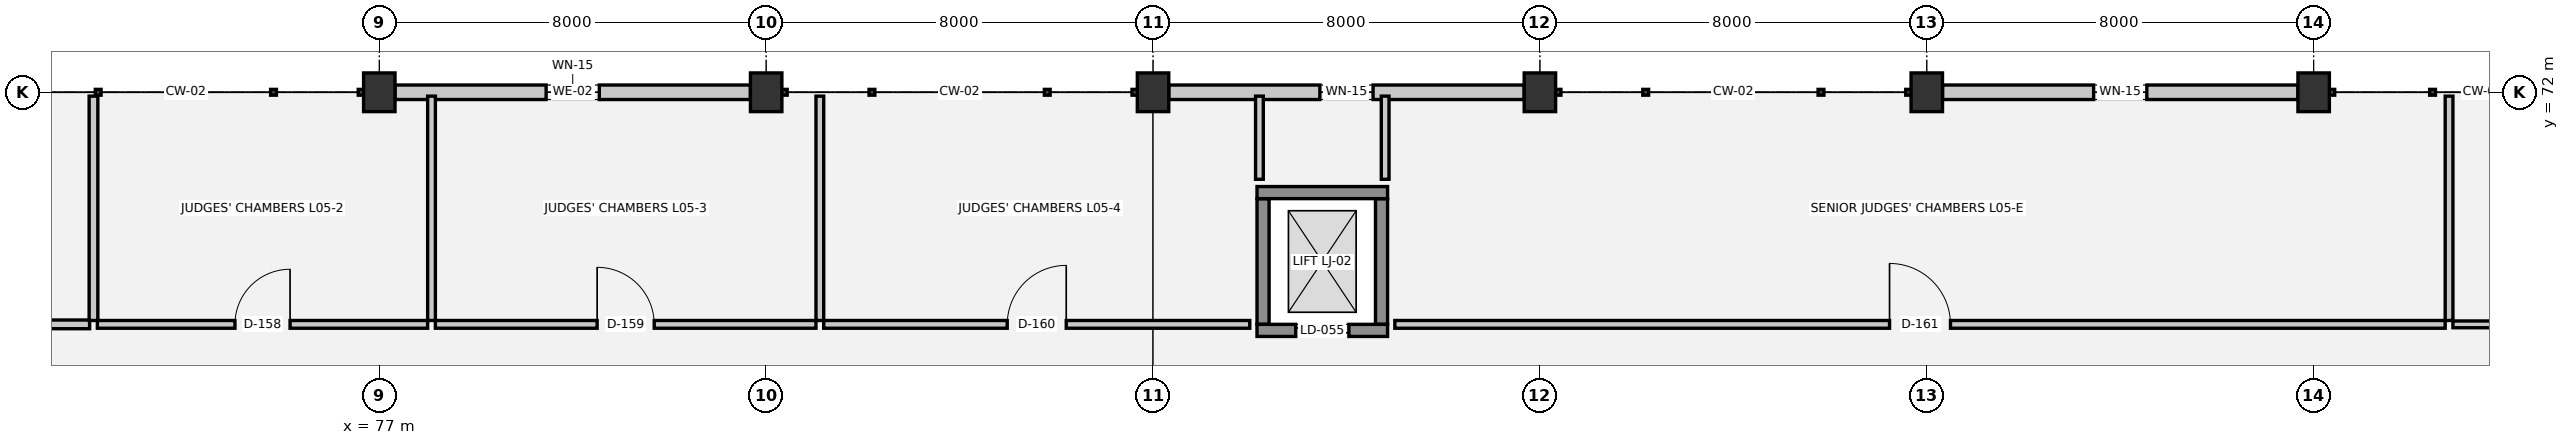
"""IFC4 building model, lengths in metres.
Left out: names, types, materials, properties, quantities, classifications, styles, units other than length and angle.
Written with IfcOpenShell. Run it as: python <this file> out.ifc"""

import sys

from ifc_helpers import new_model, si_unit, direction, frame, frame_2d, origin, origin_2d, place, context, subcontext, project, spatial, rectangle, extrude, element, fill, save


model = new_model("IFC4")
c1 = context("Model", 3, precision=1e-05, world=origin(), true_north=direction((0.0, 1.0)))
c2 = subcontext(c1, "Body", "Model", "MODEL_VIEW")
j1 = project(units=[si_unit("LENGTHUNIT", "METRE"), si_unit("PLANEANGLEUNIT", "RADIAN")], contexts=[c1])
p1 = place(None, origin())
s1 = spatial("IfcSite", under=j1, at=p1, CompositionType="ELEMENT")
p2 = place(p1, origin())
s2 = spatial("IfcBuilding", under=s1, at=p2, CompositionType="ELEMENT")
p3 = place(p2, frame((0.0, 0.0, 18.3)))
s3 = spatial("IfcBuildingStorey", under=s2, at=p3, CompositionType="ELEMENT", Elevation=18.3)
for number, where, z_axis, x_axis in (
    (1, (77.0, 72.0, 0.0), (0.0, 0.0, 1.0), (1.0, 0.0, 0.0)),
    (2, (85.0, 72.0, 0.0), (0.0, 0.0, 1.0), (1.0, 0.0, 0.0)),
    (3, (93.0, 72.0, 0.0), (0.0, 0.0, 1.0), (1.0, 0.0, 0.0)),
    (4, (101.0, 72.0, 0.0), (0.0, 0.0, 1.0), (1.0, 0.0, 0.0)),
    (5, (109.0, 72.0, 0.0), (0.0, 0.0, 1.0), (1.0, 0.0, 0.0)),
    (6, (117.0, 72.0, 0.0), (0.0, 0.0, 1.0), (1.0, 0.0, 0.0)),
):
    element("IfcColumn", number, at=place(p3, frame(where, z_axis=z_axis, x_axis=x_axis)), inside=s3, PredefinedType="COLUMN", context=c2, shape_type="SweptSolid", body=[
        extrude(rectangle(XDim=0.65, YDim=0.8, at=origin_2d()), origin(), (0.0, 0.0, 1.0), 3.75),
    ])
p4 = place(p3, frame((77.325, 72.0, 0.0), z_axis=(0.0, 0.0, 1.0), x_axis=(1.0, 0.0, 0.0)))
e7 = element("IfcWall", 7, at=p4, inside=s3, PredefinedType="SOLIDWALL", context=c2, shape_type="SweptSolid", body=[
    extrude(rectangle(XDim=7.35, YDim=0.3, at=frame_2d((3.675, 0.0))), origin(), (0.0, 0.0, 1.0), 2.6),
])
p5 = place(p4, frame((3.125, 0.0, 0.9)))
e8 = element("IfcOpeningElement", 8, at=p5, cuts=e7, PredefinedType="OPENING", context=c2, shape_type="SweptSolid", body=[
    extrude(rectangle(XDim=1.1, YDim=1.2, at=frame_2d((0.55, 0.6))), frame((0.0, 0.16, 0.0), z_axis=(0.0, -1.0, 0.0), x_axis=(1.0, 0.0, 0.0)), (0.0, 0.0, 1.0), 0.32),
])
p6 = place(p3, frame((93.325, 72.0, 0.0), z_axis=(0.0, 0.0, 1.0), x_axis=(1.0, 0.0, 0.0)))
e9 = element("IfcWall", 9, at=p6, inside=s3, PredefinedType="SOLIDWALL", context=c2, shape_type="SweptSolid", body=[
    extrude(rectangle(XDim=7.35, YDim=0.3, at=frame_2d((3.675, 0.0))), origin(), (0.0, 0.0, 1.0), 2.6),
])
p7 = place(p6, frame((3.125, 0.0, 0.9)))
e10 = element("IfcOpeningElement", 10, at=p7, cuts=e9, PredefinedType="OPENING", context=c2, shape_type="SweptSolid", body=[
    extrude(rectangle(XDim=1.1, YDim=1.2, at=frame_2d((0.55, 0.6))), frame((0.0, 0.16, 0.0), z_axis=(0.0, -1.0, 0.0), x_axis=(1.0, 0.0, 0.0)), (0.0, 0.0, 1.0), 0.32),
])
p8 = place(p3, frame((109.325, 72.0, 0.0), z_axis=(0.0, 0.0, 1.0), x_axis=(1.0, 0.0, 0.0)))
e11 = element("IfcWall", 11, at=p8, inside=s3, PredefinedType="SOLIDWALL", context=c2, shape_type="SweptSolid", body=[
    extrude(rectangle(XDim=7.35, YDim=0.3, at=frame_2d((3.675, 0.0))), origin(), (0.0, 0.0, 1.0), 2.6),
])
p9 = place(p8, frame((3.125, 0.0, 0.9)))
e12 = element("IfcOpeningElement", 12, at=p9, cuts=e11, PredefinedType="OPENING", context=c2, shape_type="SweptSolid", body=[
    extrude(rectangle(XDim=1.1, YDim=1.2, at=frame_2d((0.55, 0.6))), frame((0.0, 0.16, 0.0), z_axis=(0.0, -1.0, 0.0), x_axis=(1.0, 0.0, 0.0)), (0.0, 0.0, 1.0), 0.32),
])
p10 = place(p3, frame((95.15, 67.075, 0.0), z_axis=(0.0, 0.0, 1.0), x_axis=(1.0, 0.0, 0.0)))
e13 = element("IfcWall", 13, at=p10, inside=s3, PredefinedType="SHEAR", context=c2, shape_type="SweptSolid", body=[
    extrude(rectangle(XDim=2.7, YDim=0.25, at=frame_2d((1.35, 0.0))), origin(), (0.0, 0.0, 1.0), 3.75),
])
p11 = place(p10, frame((0.8, 0.0, 0.0)))
e14 = element("IfcOpeningElement", 14, at=p11, cuts=e13, PredefinedType="OPENING", context=c2, shape_type="SweptSolid", body=[
    extrude(rectangle(XDim=1.1, YDim=2.15, at=frame_2d((0.55, 1.075))), frame((0.0, 0.135, 0.0), z_axis=(0.0, -1.0, 0.0), x_axis=(1.0, 0.0, 0.0)), (0.0, 0.0, 1.0), 0.27),
])
p12 = place(p3, frame((97.85, 69.925, 0.0), z_axis=(0.0, 0.0, 1.0), x_axis=(-1.0, 0.0, 0.0)))
e15 = element("IfcWall", 15, at=p12, inside=s3, PredefinedType="SHEAR", context=c2, shape_type="SweptSolid", body=[
    extrude(rectangle(XDim=2.7, YDim=0.25, at=frame_2d((1.35, 0.0))), origin(), (0.0, 0.0, 1.0), 3.75),
])
for number, where, z_axis, x_axis in (
    (16, (95.275, 69.795, 0.0), (0.0, 0.0, 1.0), (0.0, -1.0, 0.0)),
    (17, (97.725, 67.205, 0.0), (0.0, 0.0, 1.0), (0.0, 1.0, 0.0)),
):
    element("IfcWall", number, at=place(p3, frame(where, z_axis=z_axis, x_axis=x_axis)), inside=s3, PredefinedType="SHEAR", context=c2, shape_type="SweptSolid", body=[
        extrude(rectangle(XDim=2.59, YDim=0.25, at=frame_2d((1.295, 0.0))), origin(), (0.0, 0.0, 1.0), 3.75),
    ])
p13 = place(p3, frame((62.08, 67.2, 0.0), z_axis=(0.0, 0.0, 1.0), x_axis=(1.0, 0.0, 0.0)))
e18 = element("IfcWall", 18, at=p13, inside=s3, PredefinedType="PARTITIONING", context=c2, shape_type="SweptSolid", body=[
    extrude(rectangle(XDim=8.93, YDim=0.18, at=frame_2d((4.465, 0.0))), origin(), (0.0, 0.0, 1.0), 3.39),
])
p14 = place(p13, frame((3.89, 0.0, 0.0)))
e19 = element("IfcOpeningElement", 19, at=p14, cuts=e18, PredefinedType="OPENING", context=c2, shape_type="SweptSolid", body=[
    extrude(rectangle(XDim=1.15, YDim=2.2, at=frame_2d((0.575, 1.1))), frame((0.0, 0.1, 0.0), z_axis=(0.0, -1.0, 0.0), x_axis=(1.0, 0.0, 0.0)), (0.0, 0.0, 1.0), 0.2),
])
p15 = place(p3, frame((71.17, 67.2, 0.0), z_axis=(0.0, 0.0, 1.0), x_axis=(1.0, 0.0, 0.0)))
e20 = element("IfcWall", 20, at=p15, inside=s3, PredefinedType="PARTITIONING", context=c2, shape_type="SweptSolid", body=[
    extrude(rectangle(XDim=6.83, YDim=0.16, at=frame_2d((3.415, 0.0))), origin(), (0.0, 0.0, 1.0), 3.39),
])
p16 = place(p15, frame((2.845, 0.0, 0.0)))
e21 = element("IfcOpeningElement", 21, at=p16, cuts=e20, PredefinedType="OPENING", context=c2, shape_type="SweptSolid", body=[
    extrude(rectangle(XDim=1.14, YDim=2.2, at=frame_2d((0.57, 1.1))), frame((0.0, 0.09, 0.0), z_axis=(0.0, -1.0, 0.0), x_axis=(1.0, 0.0, 0.0)), (0.0, 0.0, 1.0), 0.18),
])
p17 = place(p3, frame((78.16, 67.2, 0.0), z_axis=(0.0, 0.0, 1.0), x_axis=(1.0, 0.0, 0.0)))
e22 = element("IfcWall", 22, at=p17, inside=s3, PredefinedType="PARTITIONING", context=c2, shape_type="SweptSolid", body=[
    extrude(rectangle(XDim=7.87, YDim=0.16, at=frame_2d((3.935, 0.0))), origin(), (0.0, 0.0, 1.0), 3.39),
])
p18 = place(p17, frame((3.345, 0.0, 0.0)))
e23 = element("IfcOpeningElement", 23, at=p18, cuts=e22, PredefinedType="OPENING", context=c2, shape_type="SweptSolid", body=[
    extrude(rectangle(XDim=1.18, YDim=2.2, at=frame_2d((0.59, 1.1))), frame((0.0, 0.09, 0.0), z_axis=(0.0, -1.0, 0.0), x_axis=(1.0, 0.0, 0.0)), (0.0, 0.0, 1.0), 0.18),
])
p19 = place(p3, frame((86.19, 67.2, 0.0), z_axis=(0.0, 0.0, 1.0), x_axis=(1.0, 0.0, 0.0)))
e24 = element("IfcWall", 24, at=p19, inside=s3, PredefinedType="PARTITIONING", context=c2, shape_type="SweptSolid", body=[
    extrude(rectangle(XDim=8.81, YDim=0.16, at=frame_2d((4.405, 0.0))), origin(), (0.0, 0.0, 1.0), 3.39),
])
p20 = place(p19, frame((3.795, 0.0, 0.0)))
e25 = element("IfcOpeningElement", 25, at=p20, cuts=e24, PredefinedType="OPENING", context=c2, shape_type="SweptSolid", body=[
    extrude(rectangle(XDim=1.22, YDim=2.2, at=frame_2d((0.61, 1.1))), frame((0.0, 0.09, 0.0), z_axis=(0.0, -1.0, 0.0), x_axis=(1.0, 0.0, 0.0)), (0.0, 0.0, 1.0), 0.18),
])
p21 = place(p3, frame((98.0, 67.2, 0.0), z_axis=(0.0, 0.0, 1.0), x_axis=(1.0, 0.0, 0.0)))
e26 = element("IfcWall", 26, at=p21, inside=s3, PredefinedType="PARTITIONING", context=c2, shape_type="SweptSolid", body=[
    extrude(rectangle(XDim=21.72, YDim=0.16, at=frame_2d((10.86, 0.0))), origin(), (0.0, 0.0, 1.0), 3.39),
])
p22 = place(p21, frame((10.23, 0.0, 0.0)))
e27 = element("IfcOpeningElement", 27, at=p22, cuts=e26, PredefinedType="OPENING", context=c2, shape_type="SweptSolid", body=[
    extrude(rectangle(XDim=1.26, YDim=2.2, at=frame_2d((0.63, 1.1))), frame((0.0, 0.09, 0.0), z_axis=(0.0, -1.0, 0.0), x_axis=(1.0, 0.0, 0.0)), (0.0, 0.0, 1.0), 0.18),
])
p23 = place(p3, frame((119.88, 67.2, 0.0), z_axis=(0.0, 0.0, 1.0), x_axis=(1.0, 0.0, 0.0)))
e28 = element("IfcWall", 28, at=p23, inside=s3, PredefinedType="PLUMBINGWALL", context=c2, shape_type="SweptSolid", body=[
    extrude(rectangle(XDim=4.04, YDim=0.14, at=frame_2d((2.02, 0.0))), origin(), (0.0, 0.0, 1.0), 3.39),
])
p24 = place(p23, frame((1.56, 0.0, 0.0)))
e29 = element("IfcOpeningElement", 29, at=p24, cuts=e28, PredefinedType="OPENING", context=c2, shape_type="SweptSolid", body=[
    extrude(rectangle(XDim=0.92, YDim=2.1, at=frame_2d((0.46, 1.05))), frame((0.0, 0.08, 0.0), z_axis=(0.0, -1.0, 0.0), x_axis=(1.0, 0.0, 0.0)), (0.0, 0.0, 1.0), 0.16),
])
p25 = place(p3, frame((71.09, 67.28, 0.0), z_axis=(0.0, 0.0, 1.0), x_axis=(0.0, 1.0, 0.0)))
e30 = element("IfcWall", 30, at=p25, inside=s3, PredefinedType="PARTITIONING", context=c2, shape_type="SweptSolid", body=[
    extrude(rectangle(XDim=4.64, YDim=0.18, at=frame_2d((2.32, 0.0))), origin(), (0.0, 0.0, 1.0), 3.39),
])
for number, where, z_axis, x_axis in (
    (31, (78.08, 67.28, 0.0), (0.0, 0.0, 1.0), (0.0, 1.0, 0.0)),
    (32, (86.11, 67.28, 0.0), (0.0, 0.0, 1.0), (0.0, 1.0, 0.0)),
):
    element("IfcWall", number, at=place(p3, frame(where, z_axis=z_axis, x_axis=x_axis)), inside=s3, PredefinedType="PARTITIONING", context=c2, shape_type="SweptSolid", body=[
        extrude(rectangle(XDim=4.64, YDim=0.16, at=frame_2d((2.32, 0.0))), origin(), (0.0, 0.0, 1.0), 3.39),
    ])
for number, where, z_axis, x_axis in (
    (33, (95.2, 70.2, 0.0), (0.0, 0.0, 1.0), (0.0, 1.0, 0.0)),
    (34, (97.8, 70.2, 0.0), (0.0, 0.0, 1.0), (0.0, 1.0, 0.0)),
):
    element("IfcWall", number, at=place(p3, frame(where, z_axis=z_axis, x_axis=x_axis)), inside=s3, PredefinedType="PARTITIONING", context=c2, shape_type="SweptSolid", body=[
        extrude(rectangle(XDim=1.72, YDim=0.16, at=frame_2d((0.86, 0.0))), origin(), (0.0, 0.0, 1.0), 3.39),
    ])
p26 = place(p3, frame((119.8, 67.28, 0.0), z_axis=(0.0, 0.0, 1.0), x_axis=(0.0, 1.0, 0.0)))
e35 = element("IfcWall", 35, at=p26, inside=s3, PredefinedType="PARTITIONING", context=c2, shape_type="SweptSolid", body=[
    extrude(rectangle(XDim=4.64, YDim=0.16, at=frame_2d((2.32, 0.0))), origin(), (0.0, 0.0, 1.0), 3.39),
])
p27 = place(p5, origin())
e36 = element("IfcWindow", 36, at=p27, inside=s3, PartitioningType="SINGLE_PANEL", PredefinedType="WINDOW", context=c2, shape_type="SweptSolid", body=[
    extrude(rectangle(XDim=1.1, YDim=1.2, at=frame_2d((0.55, 0.6))), frame((0.0, 0.03, 0.0), z_axis=(0.0, -1.0, 0.0), x_axis=(1.0, 0.0, 0.0)), (0.0, 0.0, 1.0), 0.06),
])
fill(e8, e36)
p28 = place(p7, origin())
e37 = element("IfcWindow", 37, at=p28, inside=s3, PartitioningType="SINGLE_PANEL", PredefinedType="WINDOW", context=c2, shape_type="SweptSolid", body=[
    extrude(rectangle(XDim=1.1, YDim=1.2, at=frame_2d((0.55, 0.6))), frame((0.0, 0.03, 0.0), z_axis=(0.0, -1.0, 0.0), x_axis=(1.0, 0.0, 0.0)), (0.0, 0.0, 1.0), 0.06),
])
fill(e10, e37)
p29 = place(p9, origin())
e38 = element("IfcWindow", 38, at=p29, inside=s3, PartitioningType="SINGLE_PANEL", PredefinedType="WINDOW", context=c2, shape_type="SweptSolid", body=[
    extrude(rectangle(XDim=1.1, YDim=1.2, at=frame_2d((0.55, 0.6))), frame((0.0, 0.03, 0.0), z_axis=(0.0, -1.0, 0.0), x_axis=(1.0, 0.0, 0.0)), (0.0, 0.0, 1.0), 0.06),
])
fill(e12, e38)
p30 = place(p11, origin())
e39 = element("IfcDoor", 39, at=p30, inside=s3, OperationType="DOUBLE_DOOR_SLIDING", PredefinedType="DOOR", context=c2, shape_type="SweptSolid", body=[
    extrude(rectangle(XDim=1.1, YDim=2.15, at=frame_2d((0.55, 1.075))), frame((0.0, 0.025, 0.0), z_axis=(0.0, -1.0, 0.0), x_axis=(1.0, 0.0, 0.0)), (0.0, 0.0, 1.0), 0.05),
])
fill(e14, e39)
p31 = place(p16, origin())
e40 = element("IfcDoor", 40, at=p31, inside=s3, OperationType="SINGLE_SWING_RIGHT", PredefinedType="DOOR", context=c2, shape_type="SweptSolid", body=[
    extrude(rectangle(XDim=1.14, YDim=2.2, at=frame_2d((0.57, 1.1))), frame((0.0, 0.025, 0.0), z_axis=(0.0, -1.0, 0.0), x_axis=(1.0, 0.0, 0.0)), (0.0, 0.0, 1.0), 0.05),
])
fill(e21, e40)
p32 = place(p18, origin())
e41 = element("IfcDoor", 41, at=p32, inside=s3, OperationType="SINGLE_SWING_LEFT", PredefinedType="DOOR", context=c2, shape_type="SweptSolid", body=[
    extrude(rectangle(XDim=1.18, YDim=2.2, at=frame_2d((0.59, 1.1))), frame((0.0, 0.025, 0.0), z_axis=(0.0, -1.0, 0.0), x_axis=(1.0, 0.0, 0.0)), (0.0, 0.0, 1.0), 0.05),
])
fill(e23, e41)
p33 = place(p20, origin())
e42 = element("IfcDoor", 42, at=p33, inside=s3, OperationType="SINGLE_SWING_RIGHT", PredefinedType="DOOR", context=c2, shape_type="SweptSolid", body=[
    extrude(rectangle(XDim=1.22, YDim=2.2, at=frame_2d((0.61, 1.1))), frame((0.0, 0.025, 0.0), z_axis=(0.0, -1.0, 0.0), x_axis=(1.0, 0.0, 0.0)), (0.0, 0.0, 1.0), 0.05),
])
fill(e25, e42)
p34 = place(p22, origin())
e43 = element("IfcDoor", 43, at=p34, inside=s3, OperationType="SINGLE_SWING_LEFT", PredefinedType="DOOR", context=c2, shape_type="SweptSolid", body=[
    extrude(rectangle(XDim=1.26, YDim=2.2, at=frame_2d((0.63, 1.1))), frame((0.0, 0.025, 0.0), z_axis=(0.0, -1.0, 0.0), x_axis=(1.0, 0.0, 0.0)), (0.0, 0.0, 1.0), 0.05),
])
fill(e27, e43)
save(model, sys.argv[1])
